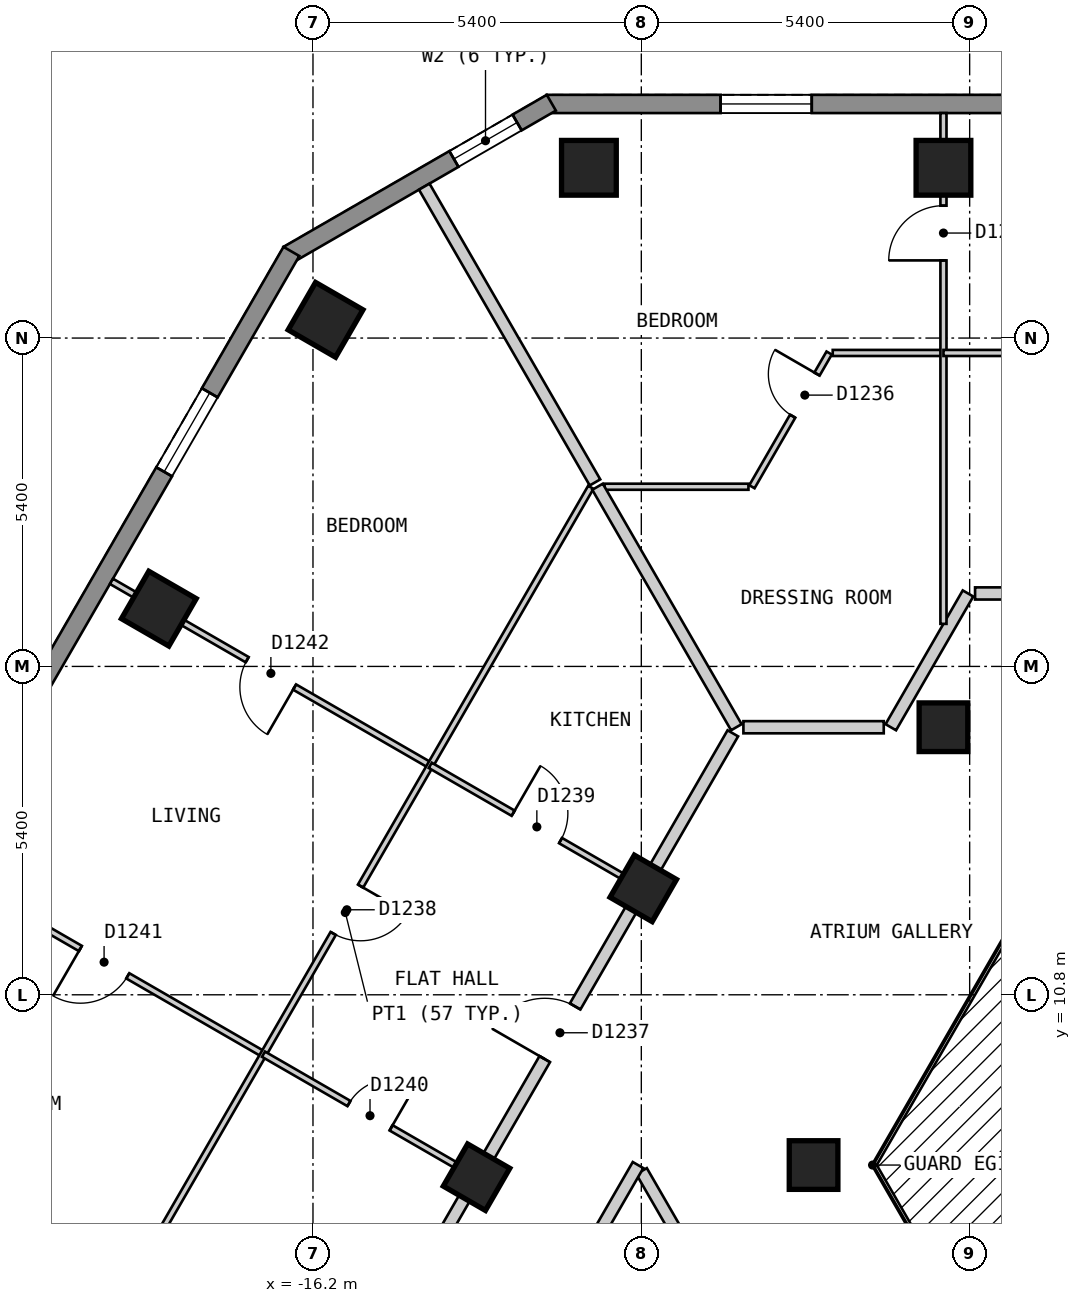
"""IFC4 building model, lengths in metres.
Left out: names, types, materials, properties, quantities, classifications, styles, units other than length and angle.
Written with IfcOpenShell. Run it as: python <this file> out.ifc"""

import sys

from ifc_helpers import new_model, si_unit, direction, frame, frame_2d, origin, origin_2d, place, context, subcontext, project, spatial, polyline, rectangle, outline, extrude, element, fill, save


model = new_model("IFC4")
c1 = context("Model", 3, precision=1e-05, world=origin(), true_north=direction((0.0, 1.0)))
c2 = subcontext(c1, "Body", "Model", "MODEL_VIEW")
j1 = project(units=[si_unit("LENGTHUNIT", "METRE"), si_unit("PLANEANGLEUNIT", "RADIAN")], contexts=[c1])
p1 = place(None, origin())
s1 = spatial("IfcSite", under=j1, at=p1, CompositionType="ELEMENT")
p2 = place(p1, origin())
s2 = spatial("IfcBuilding", under=s1, at=p2, CompositionType="ELEMENT")
p3 = place(p2, frame((0.0, 0.0, 117.6)))
s3 = spatial("IfcBuildingStorey", under=s2, at=p3, CompositionType="ELEMENT", Elevation=117.6)
for number, where, z_axis, x_axis in (
    (1, (-5.831, 24.4, 0.0), (0.0, 0.0, 1.0), (-1.0, 0.0, 0.0)),
    (2, (-11.662, 24.4, 0.0), (0.0, 0.0, 1.0), (-1.0, 0.0, 0.0)),
    (3, (-15.993, 21.9, 0.0), (0.0, 0.0, 1.0), (-0.5, -0.866, 0.0)),
    (4, (-18.735, 17.15, 0.0), (0.0, 0.0, 1.0), (-0.5, -0.866, 0.0)),
):
    element("IfcColumn", number, at=place(p3, frame(where, z_axis=z_axis, x_axis=x_axis)), inside=s3, PredefinedType="COLUMN", context=c2, shape_type="SweptSolid", body=[
        extrude(rectangle(XDim=0.9, YDim=0.9, at=origin_2d()), origin(), (0.0, 0.0, 1.0), 3.0),
    ])
for number, where, z_axis, x_axis in (
    (5, (-5.831, 15.2, 0.0), (0.0, 0.0, 1.0), (-1.0, 0.0, 0.0)),
    (6, (-10.768, 12.55, 0.0), (0.0, 0.0, 1.0), (-0.5, -0.866, 0.0)),
    (7, (-7.967, 8.0, 0.0), (0.0, 0.0, 1.0), (1.0, 0.0, 0.0)),
    (8, (-13.51, 7.8, 0.0), (0.0, 0.0, 1.0), (-0.5, -0.866, 0.0)),
):
    element("IfcColumn", number, at=place(p3, frame(where, z_axis=z_axis, x_axis=x_axis)), inside=s3, PredefinedType="COLUMN", context=c2, shape_type="SweptSolid", body=[
        extrude(rectangle(XDim=0.8, YDim=0.8, at=origin_2d()), origin(), (0.0, 0.0, 1.0), 3.0),
    ])
p4 = place(p3, frame((12.355, 25.45, 0.0), z_axis=(0.0, 0.0, 1.0), x_axis=(-1.0, 0.0, 0.0)))
e9 = element("IfcWall", 9, at=p4, inside=s3, PredefinedType="SOLIDWALL", context=c2, shape_type="SweptSolid", body=[
    extrude(outline(polyline([(0.0, -0.15), (24.71, -0.15), (24.63, 0.15), (0.08, 0.15), (0.0, -0.15)])), origin(), (0.0, 0.0, 1.0), 2.7),
])
p5 = place(p4, frame((2.858, 0.0, 0.15)))
e10 = element("IfcOpeningElement", 10, at=p5, cuts=e9, PredefinedType="OPENING", context=c2, shape_type="SweptSolid", body=[
    extrude(rectangle(XDim=1.5, YDim=2.1, at=frame_2d((0.75, 1.05))), frame((0.0, 0.16, 0.0), z_axis=(0.0, -1.0, 0.0), x_axis=(1.0, 0.0, 0.0)), (0.0, 0.0, 1.0), 0.32),
])
p6 = place(p4, frame((8.689, 0.0, 0.15)))
e11 = element("IfcOpeningElement", 11, at=p6, cuts=e9, PredefinedType="OPENING", context=c2, shape_type="SweptSolid", body=[
    extrude(rectangle(XDim=1.5, YDim=2.1, at=frame_2d((0.75, 1.05))), frame((0.0, 0.16, 0.0), z_axis=(0.0, -1.0, 0.0), x_axis=(1.0, 0.0, 0.0)), (0.0, 0.0, 1.0), 0.32),
])
p7 = place(p4, frame((14.521, 0.0, 0.15)))
e12 = element("IfcOpeningElement", 12, at=p7, cuts=e9, PredefinedType="OPENING", context=c2, shape_type="SweptSolid", body=[
    extrude(rectangle(XDim=1.5, YDim=2.1, at=frame_2d((0.75, 1.05))), frame((0.0, 0.16, 0.0), z_axis=(0.0, -1.0, 0.0), x_axis=(1.0, 0.0, 0.0)), (0.0, 0.0, 1.0), 0.32),
])
p8 = place(p4, frame((20.352, 0.0, 0.15)))
e13 = element("IfcOpeningElement", 13, at=p8, cuts=e9, PredefinedType="OPENING", context=c2, shape_type="SweptSolid", body=[
    extrude(rectangle(XDim=1.5, YDim=2.1, at=frame_2d((0.75, 1.05))), frame((0.0, 0.16, 0.0), z_axis=(0.0, -1.0, 0.0), x_axis=(1.0, 0.0, 0.0)), (0.0, 0.0, 1.0), 0.32),
])
p9 = place(p3, frame((-12.28, 25.47, 0.0), z_axis=(0.0, 0.0, 1.0), x_axis=(-0.866022959057, -0.500004234368, 0.0)))
e14 = element("IfcWall", 14, at=p9, inside=s3, PredefinedType="SOLIDWALL", context=c2, shape_type="SweptSolid", body=[
    extrude(outline(polyline([(0.0, -0.15), (5.0, -0.15), (4.92, 0.15), (0.08, 0.15), (0.0, -0.15)])), origin(), (0.0, 0.0, 1.0), 2.7),
])
p10 = place(p9, frame((0.65, 0.0, 0.15)))
e15 = element("IfcOpeningElement", 15, at=p10, cuts=e14, PredefinedType="OPENING", context=c2, shape_type="SweptSolid", body=[
    extrude(rectangle(XDim=1.2, YDim=2.1, at=frame_2d((0.6, 1.05))), frame((0.0, 0.16, 0.0), z_axis=(0.0, -1.0, 0.0), x_axis=(1.0, 0.0, 0.0)), (0.0, 0.0, 1.0), 0.32),
])
p11 = place(p3, frame((-16.555, 23.025, 0.0), z_axis=(0.0, 0.0, 1.0), x_axis=(-0.500020536353, -0.866013546791, 0.0)))
e16 = element("IfcWall", 16, at=p11, inside=s3, PredefinedType="SOLIDWALL", context=c2, shape_type="SweptSolid", body=[
    extrude(outline(polyline([(0.0, -0.15), (23.325, -0.15), (23.245, 0.15), (0.08, 0.15), (0.0, -0.15)])), origin(), (0.0, 0.0, 1.0), 2.7),
])
p12 = place(p11, frame((2.685, 0.0, 0.15)))
e17 = element("IfcOpeningElement", 17, at=p12, cuts=e16, PredefinedType="OPENING", context=c2, shape_type="SweptSolid", body=[
    extrude(rectangle(XDim=1.5, YDim=2.1, at=frame_2d((0.75, 1.05))), frame((0.0, 0.16, 0.0), z_axis=(0.0, -1.0, 0.0), x_axis=(1.0, 0.0, 0.0)), (0.0, 0.0, 1.0), 0.32),
])
p13 = place(p11, frame((8.171, 0.0, 0.15)))
e18 = element("IfcOpeningElement", 18, at=p13, cuts=e16, PredefinedType="OPENING", context=c2, shape_type="SweptSolid", body=[
    extrude(rectangle(XDim=1.5, YDim=2.1, at=frame_2d((0.75, 1.05))), frame((0.0, 0.16, 0.0), z_axis=(0.0, -1.0, 0.0), x_axis=(1.0, 0.0, 0.0)), (0.0, 0.0, 1.0), 0.32),
])
p14 = place(p11, frame((13.655, 0.0, 0.15)))
e19 = element("IfcOpeningElement", 19, at=p14, cuts=e16, PredefinedType="OPENING", context=c2, shape_type="SweptSolid", body=[
    extrude(rectangle(XDim=1.5, YDim=2.1, at=frame_2d((0.75, 1.05))), frame((0.0, 0.16, 0.0), z_axis=(0.0, -1.0, 0.0), x_axis=(1.0, 0.0, 0.0)), (0.0, 0.0, 1.0), 0.32),
])
p15 = place(p11, frame((19.14, 0.0, 0.15)))
e20 = element("IfcOpeningElement", 20, at=p15, cuts=e16, PredefinedType="OPENING", context=c2, shape_type="SweptSolid", body=[
    extrude(rectangle(XDim=1.5, YDim=2.1, at=frame_2d((0.75, 1.05))), frame((0.0, 0.16, 0.0), z_axis=(0.0, -1.0, 0.0), x_axis=(1.0, 0.0, 0.0)), (0.0, 0.0, 1.0), 0.32),
])
p16 = place(p3, frame((-10.796, 7.9, 0.0), z_axis=(0.0, 0.0, 1.0), x_axis=(0.499954271211, -0.866051803703, 0.0)))
e21 = element("IfcWall", 21, at=p16, inside=s3, PredefinedType="PARTITIONING", context=c2, shape_type="SweptSolid", body=[
    extrude(rectangle(XDim=7.536, YDim=0.2, at=frame_2d((3.768, 0.0))), origin(), (0.0, 0.0, 1.0), 2.7),
])
p17 = place(p3, frame((-9.121, 15.2, 0.0), z_axis=(0.0, 0.0, 1.0), x_axis=(1.0, 0.0, 0.0)))
e22 = element("IfcWall", 22, at=p17, inside=s3, PredefinedType="PARTITIONING", context=c2, shape_type="SweptSolid", body=[
    extrude(rectangle(XDim=2.308, YDim=0.2, at=frame_2d((1.154, 0.0))), origin(), (0.0, 0.0, 1.0), 2.7),
])
p18 = place(p3, frame((-5.311, 17.4, 0.0), z_axis=(0.0, 0.0, 1.0), x_axis=(1.0, 0.0, 0.0)))
e23 = element("IfcWall", 23, at=p18, inside=s3, PredefinedType="PARTITIONING", context=c2, shape_type="SweptSolid", body=[
    extrude(rectangle(XDim=10.738, YDim=0.2, at=frame_2d((5.369, 0.0))), origin(), (0.0, 0.0, 1.0), 2.7),
])
p19 = place(p18, frame((7.758, 0.0, 0.0)))
e24 = element("IfcOpeningElement", 24, at=p19, cuts=e23, PredefinedType="OPENING", context=c2, shape_type="SweptSolid", body=[
    extrude(rectangle(XDim=1.0, YDim=2.1, at=frame_2d((0.5, 1.05))), frame((0.0, 0.11, 0.0), z_axis=(0.0, -1.0, 0.0), x_axis=(1.0, 0.0, 0.0)), (0.0, 0.0, 1.0), 0.22),
])
p20 = place(p3, frame((-15.242, 0.399, 0.0), z_axis=(0.0, 0.0, 1.0), x_axis=(0.499953615651, 0.866052182145, 0.0)))
e25 = element("IfcWall", 25, at=p20, inside=s3, PredefinedType="PARTITIONING", context=c2, shape_type="SweptSolid", body=[
    extrude(rectangle(XDim=8.777, YDim=0.2, at=frame_2d((4.388, 0.0))), origin(), (0.0, 0.0, 1.0), 2.7),
])
p21 = place(p20, frame((3.938, 0.0, 0.0)))
e26 = element("IfcOpeningElement", 26, at=p21, cuts=e25, PredefinedType="OPENING", context=c2, shape_type="SweptSolid", body=[
    extrude(rectangle(XDim=0.9, YDim=2.1, at=frame_2d((0.45, 1.05))), frame((0.0, 0.11, 0.0), z_axis=(0.0, -1.0, 0.0), x_axis=(1.0, 0.0, 0.0)), (0.0, 0.0, 1.0), 0.22),
])
p22 = place(p3, frame((-6.697, 15.2, 0.0), z_axis=(0.0, 0.0, 1.0), x_axis=(0.499963722229, 0.866046347752, 0.0)))
e27 = element("IfcWall", 27, at=p22, inside=s3, PredefinedType="PARTITIONING", context=c2, shape_type="SweptSolid", body=[
    extrude(rectangle(XDim=2.54, YDim=0.2, at=frame_2d((1.27, 0.0))), origin(), (0.0, 0.0, 1.0), 2.7),
])
p23 = place(p3, frame((-17.753, 0.45, 0.0), z_axis=(0.0, 0.0, 1.0), x_axis=(0.499988552313, 0.866032013009, 0.0)))
e28 = element("IfcWall", 28, at=p23, inside=s3, PredefinedType="PARTITIONING", context=c2, shape_type="SweptSolid", body=[
    extrude(rectangle(XDim=16.917, YDim=0.2, at=frame_2d((8.458, 0.0))), origin(), (0.0, 0.0, 1.0), 2.7),
])
p24 = place(p23, frame((10.73, 0.0, 0.0)))
e29 = element("IfcOpeningElement", 29, at=p24, cuts=e28, PredefinedType="OPENING", context=c2, shape_type="SweptSolid", body=[
    extrude(rectangle(XDim=1.0, YDim=2.1, at=frame_2d((0.5, 1.05))), frame((0.0, 0.11, 0.0), z_axis=(0.0, -1.0, 0.0), x_axis=(1.0, 0.0, 0.0)), (0.0, 0.0, 1.0), 0.22),
])
p25 = place(p23, frame((0.594, 0.0, 0.0)))
e30 = element("IfcOpeningElement", 30, at=p25, cuts=e28, PredefinedType="OPENING", context=c2, shape_type="SweptSolid", body=[
    extrude(rectangle(XDim=1.0, YDim=2.1, at=frame_2d((0.5, 1.05))), frame((0.0, 0.11, 0.0), z_axis=(0.0, -1.0, 0.0), x_axis=(1.0, 0.0, 0.0)), (0.0, 0.0, 1.0), 0.22),
])
p26 = place(p3, frame((-22.257, 12.85, 0.0), z_axis=(0.0, 0.0, 1.0), x_axis=(0.866028448709, -0.499994725999, 0.0)))
e31 = element("IfcWall", 31, at=p26, inside=s3, PredefinedType="PARTITIONING", context=c2, shape_type="SweptSolid", body=[
    extrude(rectangle(XDim=6.054, YDim=0.1, at=frame_2d((3.027, 0.0))), origin(), (0.0, 0.0, 1.0), 2.7),
])
p27 = place(p26, frame((2.577, 0.0, 0.0)))
e32 = element("IfcOpeningElement", 32, at=p27, cuts=e31, PredefinedType="OPENING", context=c2, shape_type="SweptSolid", body=[
    extrude(rectangle(XDim=0.9, YDim=2.1, at=frame_2d((0.45, 1.05))), frame((0.0, 0.06, 0.0), z_axis=(0.0, -1.0, 0.0), x_axis=(1.0, 0.0, 0.0)), (0.0, 0.0, 1.0), 0.12),
])
p28 = place(p3, frame((-19.514, 17.599, 0.0), z_axis=(0.0, 0.0, 1.0), x_axis=(0.866088213453, -0.49989119468, 0.0)))
e33 = element("IfcWall", 33, at=p28, inside=s3, PredefinedType="PARTITIONING", context=c2, shape_type="SweptSolid", body=[
    extrude(rectangle(XDim=6.053, YDim=0.1, at=frame_2d((3.027, 0.0))), origin(), (0.0, 0.0, 1.0), 2.7),
])
p29 = place(p28, frame((2.577, 0.0, 0.0)))
e34 = element("IfcOpeningElement", 34, at=p29, cuts=e33, PredefinedType="OPENING", context=c2, shape_type="SweptSolid", body=[
    extrude(rectangle(XDim=0.9, YDim=2.1, at=frame_2d((0.45, 1.05))), frame((0.0, 0.06, 0.0), z_axis=(0.0, -1.0, 0.0), x_axis=(1.0, 0.0, 0.0)), (0.0, 0.0, 1.0), 0.12),
])
p30 = place(p3, frame((-11.405, 19.155, 0.0), z_axis=(0.0, 0.0, 1.0), x_axis=(1.0, 0.0, 0.0)))
e35 = element("IfcWall", 35, at=p30, inside=s3, PredefinedType="PARTITIONING", context=c2, shape_type="SweptSolid", body=[
    extrude(rectangle(XDim=2.367, YDim=0.1, at=frame_2d((1.184, 0.0))), origin(), (0.0, 0.0, 1.0), 2.7),
])
p31 = place(p3, frame((-7.652, 21.355, 0.0), z_axis=(0.0, 0.0, 1.0), x_axis=(1.0, 0.0, 0.0)))
e36 = element("IfcWall", 36, at=p31, inside=s3, PredefinedType="PARTITIONING", context=c2, shape_type="SweptSolid", body=[
    extrude(rectangle(XDim=1.821, YDim=0.1, at=frame_2d((0.911, 0.0))), origin(), (0.0, 0.0, 1.0), 2.7),
])
p32 = place(p3, frame((-8.981, 19.155, 0.0), z_axis=(0.0, 0.0, 1.0), x_axis=(0.500130227609, 0.865950203783, 0.0)))
e37 = element("IfcWall", 37, at=p32, inside=s3, PredefinedType="PARTITIONING", context=c2, shape_type="SweptSolid", body=[
    extrude(rectangle(XDim=2.539, YDim=0.1, at=frame_2d((1.27, 0.0))), origin(), (0.0, 0.0, 1.0), 2.7),
])
p33 = place(p32, frame((1.34, 0.0, 0.0)))
e38 = element("IfcOpeningElement", 38, at=p33, cuts=e37, PredefinedType="OPENING", context=c2, shape_type="SweptSolid", body=[
    extrude(rectangle(XDim=0.8, YDim=2.1, at=frame_2d((0.4, 1.05))), frame((0.0, 0.06, 0.0), z_axis=(0.0, -1.0, 0.0), x_axis=(1.0, 0.0, 0.0)), (0.0, 0.0, 1.0), 0.12),
])
p34 = place(p3, frame((-19.706, 5.16, 0.0), z_axis=(0.0, 0.0, 1.0), x_axis=(0.500003799672, 0.866023210032, 0.0)))
e39 = element("IfcWall", 39, at=p34, inside=s3, PredefinedType="PARTITIONING", context=c2, shape_type="SweptSolid", body=[
    extrude(rectangle(XDim=16.15, YDim=0.1, at=frame_2d((8.075, 0.0))), origin(), (0.0, 0.0, 1.0), 2.7),
])
p35 = place(p34, frame((7.677, 0.0, 0.0)))
e40 = element("IfcOpeningElement", 40, at=p35, cuts=e39, PredefinedType="OPENING", context=c2, shape_type="SweptSolid", body=[
    extrude(rectangle(XDim=0.9, YDim=2.1, at=frame_2d((0.45, 1.05))), frame((0.0, 0.06, 0.0), z_axis=(0.0, -1.0, 0.0), x_axis=(1.0, 0.0, 0.0)), (0.0, 0.0, 1.0), 0.12),
])
p36 = place(p3, frame((-5.831, 16.9, 0.0), z_axis=(0.0, 0.0, 1.0), x_axis=(0.0, 1.0, 0.0)))
e41 = element("IfcWall", 41, at=p36, inside=s3, PredefinedType="PARTITIONING", context=c2, shape_type="SweptSolid", body=[
    extrude(rectangle(XDim=8.4, YDim=0.1, at=frame_2d((4.2, 0.0))), origin(), (0.0, 0.0, 1.0), 2.7),
])
p37 = place(p36, frame((5.977, 0.0, 0.0)))
e42 = element("IfcOpeningElement", 42, at=p37, cuts=e41, PredefinedType="OPENING", context=c2, shape_type="SweptSolid", body=[
    extrude(rectangle(XDim=0.9, YDim=2.1, at=frame_2d((0.45, 1.05))), frame((0.0, 0.06, 0.0), z_axis=(0.0, -1.0, 0.0), x_axis=(1.0, 0.0, 0.0)), (0.0, 0.0, 1.0), 0.12),
])
p38 = place(p3, frame((-14.37, 24.09, 0.0), z_axis=(0.0, 0.0, 1.0), x_axis=(0.499982088007, -0.866035745032, 0.0)))
e43 = element("IfcWall", 43, at=p38, inside=s3, PredefinedType="PARTITIONING", context=c2, shape_type="SweptSolid", body=[
    extrude(rectangle(XDim=5.616, YDim=0.2, at=frame_2d((2.808, 0.0))), origin(), (0.0, 0.0, 1.0), 2.7),
])
p39 = place(p3, frame((-11.52, 19.155, 0.0), z_axis=(0.0, 0.0, 1.0), x_axis=(0.499916824138, -0.866073420066, 0.0)))
e44 = element("IfcWall", 44, at=p39, inside=s3, PredefinedType="PARTITIONING", context=c2, shape_type="SweptSolid", body=[
    extrude(rectangle(XDim=4.567, YDim=0.2, at=frame_2d((2.283, 0.0))), origin(), (0.0, 0.0, 1.0), 2.7),
])
p40 = place(p3, frame((-24.999, 8.1, 0.0), z_axis=(0.0, 0.0, 1.0), x_axis=(0.866013897511, -0.50001992892, 0.0)))
e45 = element("IfcWall", 45, at=p40, inside=s3, PredefinedType="PARTITIONING", context=c2, shape_type="SweptSolid", body=[
    extrude(rectangle(XDim=5.92, YDim=0.2, at=frame_2d((2.96, 0.0))), origin(), (0.0, 0.0, 1.0), 2.7),
])
p41 = place(p3, frame((-17.014, 9.823, 0.0), z_axis=(0.0, 0.0, 1.0), x_axis=(0.866076396086, -0.499911668341, 0.0)))
e46 = element("IfcWall", 46, at=p41, inside=s3, PredefinedType="PARTITIONING", context=c2, shape_type="SweptSolid", body=[
    extrude(rectangle(XDim=3.947, YDim=0.1, at=frame_2d((1.973, 0.0))), origin(), (0.0, 0.0, 1.0), 2.7),
])
p42 = place(p41, frame((1.623, 0.0, 0.0)))
e47 = element("IfcOpeningElement", 47, at=p42, cuts=e46, PredefinedType="OPENING", context=c2, shape_type="SweptSolid", body=[
    extrude(rectangle(XDim=0.8, YDim=2.1, at=frame_2d((0.4, 1.05))), frame((0.0, 0.06, 0.0), z_axis=(0.0, -1.0, 0.0), x_axis=(1.0, 0.0, 0.0)), (0.0, 0.0, 1.0), 0.12),
])
p43 = place(p3, frame((-14.271, 14.573, 0.0), z_axis=(0.0, 0.0, 1.0), x_axis=(0.866014535457, -0.500018824023, 0.0)))
e48 = element("IfcWall", 48, at=p43, inside=s3, PredefinedType="PARTITIONING", context=c2, shape_type="SweptSolid", body=[
    extrude(rectangle(XDim=3.946, YDim=0.1, at=frame_2d((1.973, 0.0))), origin(), (0.0, 0.0, 1.0), 2.7),
])
p44 = place(p43, frame((1.574, 0.0, 0.0)))
e49 = element("IfcOpeningElement", 49, at=p44, cuts=e48, PredefinedType="OPENING", context=c2, shape_type="SweptSolid", body=[
    extrude(rectangle(XDim=0.9, YDim=2.1, at=frame_2d((0.45, 1.05))), frame((0.0, 0.06, 0.0), z_axis=(0.0, -1.0, 0.0), x_axis=(1.0, 0.0, 0.0)), (0.0, 0.0, 1.0), 0.12),
])
p45 = place(p3, frame((-5.831, 21.355, 0.0), z_axis=(0.0, 0.0, 1.0), x_axis=(1.0, 0.0, 0.0)))
e50 = element("IfcWall", 50, at=p45, inside=s3, PredefinedType="PARTITIONING", context=c2, shape_type="SweptSolid", body=[
    extrude(rectangle(XDim=5.781, YDim=0.1, at=frame_2d((2.891, 0.0))), origin(), (0.0, 0.0, 1.0), 2.7),
])
p46 = place(p8, origin())
e51 = element("IfcWindow", 51, at=p46, inside=s3, PartitioningType="SINGLE_PANEL", PredefinedType="WINDOW", context=c2, shape_type="SweptSolid", body=[
    extrude(rectangle(XDim=1.5, YDim=2.1, at=frame_2d((0.75, 1.05))), frame((0.0, 0.03, 0.0), z_axis=(0.0, -1.0, 0.0), x_axis=(1.0, 0.0, 0.0)), (0.0, 0.0, 1.0), 0.06),
])
fill(e13, e51)
p47 = place(p10, origin())
e52 = element("IfcWindow", 52, at=p47, inside=s3, PartitioningType="SINGLE_PANEL", PredefinedType="WINDOW", context=c2, shape_type="SweptSolid", body=[
    extrude(rectangle(XDim=1.2, YDim=2.1, at=frame_2d((0.6, 1.05))), frame((0.0, 0.03, 0.0), z_axis=(0.0, -1.0, 0.0), x_axis=(1.0, 0.0, 0.0)), (0.0, 0.0, 1.0), 0.06),
])
fill(e15, e52)
p48 = place(p12, origin())
e53 = element("IfcWindow", 53, at=p48, inside=s3, PartitioningType="SINGLE_PANEL", PredefinedType="WINDOW", context=c2, shape_type="SweptSolid", body=[
    extrude(rectangle(XDim=1.5, YDim=2.1, at=frame_2d((0.75, 1.05))), frame((0.0, 0.03, 0.0), z_axis=(0.0, -1.0, 0.0), x_axis=(1.0, 0.0, 0.0)), (0.0, 0.0, 1.0), 0.06),
])
fill(e17, e53)
p49 = place(p37, origin())
e54 = element("IfcDoor", 54, at=p49, inside=s3, OperationType="SINGLE_SWING_LEFT", PredefinedType="DOOR", context=c2, shape_type="SweptSolid", body=[
    extrude(rectangle(XDim=0.9, YDim=2.1, at=frame_2d((0.45, 1.05))), frame((0.0, 0.025, 0.0), z_axis=(0.0, -1.0, 0.0), x_axis=(1.0, 0.0, 0.0)), (0.0, 0.0, 1.0), 0.05),
])
fill(e42, e54)
p50 = place(p33, origin())
e55 = element("IfcDoor", 55, at=p50, inside=s3, OperationType="SINGLE_SWING_RIGHT", PredefinedType="DOOR", context=c2, shape_type="SweptSolid", body=[
    extrude(rectangle(XDim=0.8, YDim=2.1, at=frame_2d((0.4, 1.05))), frame((0.0, 0.025, 0.0), z_axis=(0.0, -1.0, 0.0), x_axis=(1.0, 0.0, 0.0)), (0.0, 0.0, 1.0), 0.05),
])
fill(e38, e55)
p51 = place(p24, origin())
e56 = element("IfcDoor", 56, at=p51, inside=s3, OperationType="SINGLE_SWING_LEFT", PredefinedType="DOOR", context=c2, shape_type="SweptSolid", body=[
    extrude(rectangle(XDim=1.0, YDim=2.1, at=frame_2d((0.5, 1.05))), frame((0.0, 0.025, 0.0), z_axis=(0.0, -1.0, 0.0), x_axis=(1.0, 0.0, 0.0)), (0.0, 0.0, 1.0), 0.05),
])
fill(e29, e56)
p52 = place(p35, origin())
e57 = element("IfcDoor", 57, at=p52, inside=s3, OperationType="SINGLE_SWING_RIGHT", PredefinedType="DOOR", context=c2, shape_type="SweptSolid", body=[
    extrude(rectangle(XDim=0.9, YDim=2.1, at=frame_2d((0.45, 1.05))), frame((0.0, 0.025, 0.0), z_axis=(0.0, -1.0, 0.0), x_axis=(1.0, 0.0, 0.0)), (0.0, 0.0, 1.0), 0.05),
])
fill(e40, e57)
p53 = place(p44, origin())
e58 = element("IfcDoor", 58, at=p53, inside=s3, OperationType="SINGLE_SWING_LEFT", PredefinedType="DOOR", context=c2, shape_type="SweptSolid", body=[
    extrude(rectangle(XDim=0.9, YDim=2.1, at=frame_2d((0.45, 1.05))), frame((0.0, 0.025, 0.0), z_axis=(0.0, -1.0, 0.0), x_axis=(1.0, 0.0, 0.0)), (0.0, 0.0, 1.0), 0.05),
])
fill(e49, e58)
p54 = place(p42, origin())
e59 = element("IfcDoor", 59, at=p54, inside=s3, OperationType="SINGLE_SWING_RIGHT", PredefinedType="DOOR", context=c2, shape_type="SweptSolid", body=[
    extrude(rectangle(XDim=0.8, YDim=2.1, at=frame_2d((0.4, 1.05))), frame((0.0, 0.025, 0.0), z_axis=(0.0, -1.0, 0.0), x_axis=(1.0, 0.0, 0.0)), (0.0, 0.0, 1.0), 0.05),
])
fill(e47, e59)
p55 = place(p27, origin())
e60 = element("IfcDoor", 60, at=p55, inside=s3, OperationType="SINGLE_SWING_LEFT", PredefinedType="DOOR", context=c2, shape_type="SweptSolid", body=[
    extrude(rectangle(XDim=0.9, YDim=2.1, at=frame_2d((0.45, 1.05))), frame((0.0, 0.025, 0.0), z_axis=(0.0, -1.0, 0.0), x_axis=(1.0, 0.0, 0.0)), (0.0, 0.0, 1.0), 0.05),
])
fill(e32, e60)
p56 = place(p29, origin())
e61 = element("IfcDoor", 61, at=p56, inside=s3, OperationType="SINGLE_SWING_RIGHT", PredefinedType="DOOR", context=c2, shape_type="SweptSolid", body=[
    extrude(rectangle(XDim=0.9, YDim=2.1, at=frame_2d((0.45, 1.05))), frame((0.0, 0.025, 0.0), z_axis=(0.0, -1.0, 0.0), x_axis=(1.0, 0.0, 0.0)), (0.0, 0.0, 1.0), 0.05),
])
fill(e34, e61)
save(model, sys.argv[1])
